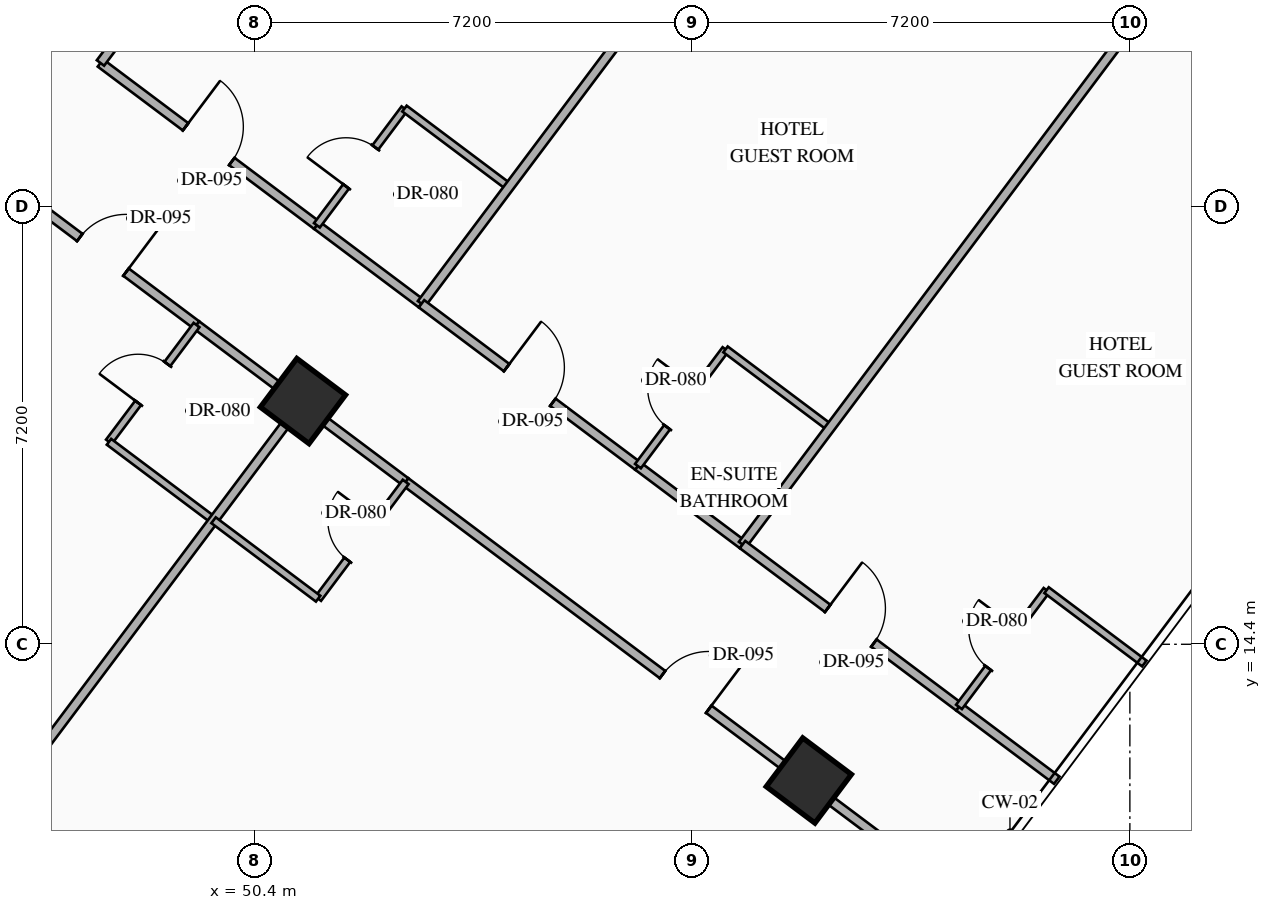
"""IFC4 building model, lengths in metres.
Left out: names, types, materials, properties, quantities, classifications, styles, units other than length and angle.
Written with IfcOpenShell. Run it as: python <this file> out.ifc"""

import sys

from ifc_helpers import new_model, si_unit, direction, frame, frame_2d, origin, origin_2d, place, context, subcontext, project, spatial, rectangle, hollow_rectangle, extrude, element, fill, save


model = new_model("IFC4")
c1 = context("Model", 3, precision=1e-05, world=origin(), true_north=direction((0.0, 1.0)))
c2 = subcontext(c1, "Body", "Model", "MODEL_VIEW")
j1 = project(units=[si_unit("LENGTHUNIT", "METRE"), si_unit("PLANEANGLEUNIT", "RADIAN")], contexts=[c1])
p1 = place(None, origin())
s1 = spatial("IfcSite", under=j1, at=p1, CompositionType="ELEMENT")
p2 = place(p1, origin())
s2 = spatial("IfcBuilding", under=s1, at=p2, CompositionType="ELEMENT")
p3 = place(p2, frame((0.0, 0.0, 53.35)))
s3 = spatial("IfcBuildingStorey", under=s2, at=p3, CompositionType="ELEMENT", Elevation=53.35)
for number, where, z_axis, x_axis in (
    (1, (51.2, 18.4, 0.0), (0.0, 0.0, 1.0), (0.8, -0.6, 0.0)),
    (2, (59.52, 12.16, 0.0), (0.0, 0.0, 1.0), (0.8, -0.6, 0.0)),
):
    element("IfcColumn", number, at=place(p3, frame(where, z_axis=z_axis, x_axis=x_axis)), inside=s3, PredefinedType="COLUMN", context=c2, shape_type="SweptSolid", body=[
        extrude(hollow_rectangle(XDim=1.0, YDim=1.0, WallThickness=0.038, at=origin_2d()), origin(), (0.0, 0.0, 1.0), 3.35),
    ])
p4 = place(p3, frame((44.86, 40.73, 0.0), z_axis=(0.0, 0.0, 1.0), x_axis=(0.800006902154, -0.599990797017, 0.0)))
e3 = element("IfcWall", 3, at=p4, inside=s3, PredefinedType="STANDARD", context=c2, shape_type="SweptSolid", body=[
    extrude(rectangle(XDim=29.712, YDim=0.28, at=frame_2d((14.856, 0.0))), origin(), (0.0, 0.0, 1.0), 3.13),
])
p5 = place(p4, frame((14.249, 0.0, 0.0)))
e4 = element("IfcOpeningElement", 4, at=p5, cuts=e3, PredefinedType="OPENING", context=c2, shape_type="SweptSolid", body=[
    extrude(rectangle(XDim=1.1, YDim=2.2, at=frame_2d((0.55, 1.1))), frame((0.0, 0.15, 0.0), z_axis=(0.0, -1.0, 0.0), x_axis=(1.0, 0.0, 0.0)), (0.0, 0.0, 1.0), 0.3),
])
p6 = place(p4, frame((1.612, 0.0, 0.85)))
e5 = element("IfcOpeningElement", 5, at=p6, cuts=e3, PredefinedType="OPENING", context=c2, shape_type="SweptSolid", body=[
    extrude(rectangle(XDim=1.4, YDim=1.8, at=frame_2d((0.7, 0.9))), frame((0.0, 0.15, 0.0), z_axis=(0.0, -1.0, 0.0), x_axis=(1.0, 0.0, 0.0)), (0.0, 0.0, 1.0), 0.3),
])
p7 = place(p4, frame((5.667, 0.0, 0.85)))
e6 = element("IfcOpeningElement", 6, at=p7, cuts=e3, PredefinedType="OPENING", context=c2, shape_type="SweptSolid", body=[
    extrude(rectangle(XDim=1.4, YDim=1.8, at=frame_2d((0.7, 0.9))), frame((0.0, 0.15, 0.0), z_axis=(0.0, -1.0, 0.0), x_axis=(1.0, 0.0, 0.0)), (0.0, 0.0, 1.0), 0.3),
])
p8 = place(p4, frame((9.912, 0.0, 0.85)))
e7 = element("IfcOpeningElement", 7, at=p8, cuts=e3, PredefinedType="OPENING", context=c2, shape_type="SweptSolid", body=[
    extrude(rectangle(XDim=1.4, YDim=1.8, at=frame_2d((0.7, 0.9))), frame((0.0, 0.15, 0.0), z_axis=(0.0, -1.0, 0.0), x_axis=(1.0, 0.0, 0.0)), (0.0, 0.0, 1.0), 0.3),
])
p9 = place(p4, frame((19.743, 0.0, 0.85)))
e8 = element("IfcOpeningElement", 8, at=p9, cuts=e3, PredefinedType="OPENING", context=c2, shape_type="SweptSolid", body=[
    extrude(rectangle(XDim=1.4, YDim=1.8, at=frame_2d((0.7, 0.9))), frame((0.0, 0.15, 0.0), z_axis=(0.0, -1.0, 0.0), x_axis=(1.0, 0.0, 0.0)), (0.0, 0.0, 1.0), 0.3),
])
p10 = place(p4, frame((22.645, 0.0, 0.85)))
e9 = element("IfcOpeningElement", 9, at=p10, cuts=e3, PredefinedType="OPENING", context=c2, shape_type="SweptSolid", body=[
    extrude(rectangle(XDim=1.4, YDim=1.8, at=frame_2d((0.7, 0.9))), frame((0.0, 0.15, 0.0), z_axis=(0.0, -1.0, 0.0), x_axis=(1.0, 0.0, 0.0)), (0.0, 0.0, 1.0), 0.3),
])
p11 = place(p4, frame((26.7, 0.0, 0.85)))
e10 = element("IfcOpeningElement", 10, at=p11, cuts=e3, PredefinedType="OPENING", context=c2, shape_type="SweptSolid", body=[
    extrude(rectangle(XDim=1.4, YDim=1.8, at=frame_2d((0.7, 0.9))), frame((0.0, 0.15, 0.0), z_axis=(0.0, -1.0, 0.0), x_axis=(1.0, 0.0, 0.0)), (0.0, 0.0, 1.0), 0.3),
])
p12 = place(p3, frame((53.318, 2.487, 0.0), z_axis=(0.0, 0.0, 1.0), x_axis=(-0.800004174678, 0.599994433723, 0.0)))
e11 = element("IfcWall", 11, at=p12, inside=s3, PredefinedType="STANDARD", context=c2, shape_type="SweptSolid", body=[
    extrude(rectangle(XDim=35.089, YDim=0.28, at=frame_2d((17.544, 0.0))), origin(), (0.0, 0.0, 1.0), 3.13),
])
p13 = place(p12, frame((1.931, 0.0, 0.85)))
e12 = element("IfcOpeningElement", 12, at=p13, cuts=e11, PredefinedType="OPENING", context=c2, shape_type="SweptSolid", body=[
    extrude(rectangle(XDim=1.4, YDim=1.8, at=frame_2d((0.7, 0.9))), frame((0.0, 0.15, 0.0), z_axis=(0.0, -1.0, 0.0), x_axis=(1.0, 0.0, 0.0)), (0.0, 0.0, 1.0), 0.3),
])
p14 = place(p12, frame((6.819, 0.0, 0.85)))
e13 = element("IfcOpeningElement", 13, at=p14, cuts=e11, PredefinedType="OPENING", context=c2, shape_type="SweptSolid", body=[
    extrude(rectangle(XDim=1.4, YDim=1.8, at=frame_2d((0.7, 0.9))), frame((0.0, 0.15, 0.0), z_axis=(0.0, -1.0, 0.0), x_axis=(1.0, 0.0, 0.0)), (0.0, 0.0, 1.0), 0.3),
])
p15 = place(p12, frame((11.832, 0.0, 0.85)))
e14 = element("IfcOpeningElement", 14, at=p15, cuts=e11, PredefinedType="OPENING", context=c2, shape_type="SweptSolid", body=[
    extrude(rectangle(XDim=1.4, YDim=1.8, at=frame_2d((0.7, 0.9))), frame((0.0, 0.15, 0.0), z_axis=(0.0, -1.0, 0.0), x_axis=(1.0, 0.0, 0.0)), (0.0, 0.0, 1.0), 0.3),
])
p16 = place(p12, frame((17.647, 0.0, 0.85)))
e15 = element("IfcOpeningElement", 15, at=p16, cuts=e11, PredefinedType="OPENING", context=c2, shape_type="SweptSolid", body=[
    extrude(rectangle(XDim=1.4, YDim=1.8, at=frame_2d((0.7, 0.9))), frame((0.0, 0.15, 0.0), z_axis=(0.0, -1.0, 0.0), x_axis=(1.0, 0.0, 0.0)), (0.0, 0.0, 1.0), 0.3),
])
p17 = place(p12, frame((21.857, 0.0, 0.85)))
e16 = element("IfcOpeningElement", 16, at=p17, cuts=e11, PredefinedType="OPENING", context=c2, shape_type="SweptSolid", body=[
    extrude(rectangle(XDim=1.4, YDim=1.8, at=frame_2d((0.7, 0.9))), frame((0.0, 0.15, 0.0), z_axis=(0.0, -1.0, 0.0), x_axis=(1.0, 0.0, 0.0)), (0.0, 0.0, 1.0), 0.3),
])
p18 = place(p12, frame((26.87, 0.0, 0.85)))
e17 = element("IfcOpeningElement", 17, at=p18, cuts=e11, PredefinedType="OPENING", context=c2, shape_type="SweptSolid", body=[
    extrude(rectangle(XDim=1.4, YDim=1.8, at=frame_2d((0.7, 0.9))), frame((0.0, 0.15, 0.0), z_axis=(0.0, -1.0, 0.0), x_axis=(1.0, 0.0, 0.0)), (0.0, 0.0, 1.0), 0.3),
])
p19 = place(p12, frame((31.757, 0.0, 0.85)))
e18 = element("IfcOpeningElement", 18, at=p19, cuts=e11, PredefinedType="OPENING", context=c2, shape_type="SweptSolid", body=[
    extrude(rectangle(XDim=1.4, YDim=1.8, at=frame_2d((0.7, 0.9))), frame((0.0, 0.15, 0.0), z_axis=(0.0, -1.0, 0.0), x_axis=(1.0, 0.0, 0.0)), (0.0, 0.0, 1.0), 0.3),
])
p20 = place(p3, frame((47.87, 23.96, 0.0), z_axis=(0.0, 0.0, 1.0), x_axis=(0.799993416095, -0.600008778439, 0.0)))
e19 = element("IfcWall", 19, at=p20, inside=s3, PredefinedType="PARTITIONING", context=c2, shape_type="SweptSolid", body=[
    extrude(rectangle(XDim=4.45, YDim=0.15, at=frame_2d((2.225, 0.0))), origin(), (0.0, 0.0, 1.0), 2.775),
])
p21 = place(p20, frame((1.75, 0.0, 0.0)))
e20 = element("IfcOpeningElement", 20, at=p21, cuts=e19, PredefinedType="OPENING", context=c2, shape_type="SweptSolid", body=[
    extrude(rectangle(XDim=0.95, YDim=2.15, at=frame_2d((0.475, 1.075))), frame((0.0, 0.085, 0.0), z_axis=(0.0, -1.0, 0.0), x_axis=(1.0, 0.0, 0.0)), (0.0, 0.0, 1.0), 0.17),
])
p22 = place(p3, frame((51.43, 21.29, 0.0), z_axis=(0.0, 0.0, 1.0), x_axis=(0.79998637334, -0.60001816845, 0.0)))
e21 = element("IfcWall", 21, at=p22, inside=s3, PredefinedType="PARTITIONING", context=c2, shape_type="SweptSolid", body=[
    extrude(rectangle(XDim=2.15, YDim=0.15, at=frame_2d((1.075, 0.0))), origin(), (0.0, 0.0, 1.0), 2.775),
])
p23 = place(p3, frame((51.43, 21.29, 0.0), z_axis=(0.0, 0.0, 1.0), x_axis=(0.600065100855, 0.79995117022, 0.0)))
e22 = element("IfcWall", 22, at=p23, inside=s3, PredefinedType="PARTITIONING", context=c2, shape_type="SweptSolid", body=[
    extrude(rectangle(XDim=2.4, YDim=0.12, at=frame_2d((1.2, 0.0))), origin(), (0.0, 0.0, 1.0), 3.13),
])
p24 = place(p23, frame((0.8, 0.0, 0.0)))
e23 = element("IfcOpeningElement", 23, at=p24, cuts=e22, PredefinedType="OPENING", context=c2, shape_type="SweptSolid", body=[
    extrude(rectangle(XDim=0.8, YDim=2.06, at=frame_2d((0.4, 1.03))), frame((0.0, 0.07, 0.0), z_axis=(0.0, -1.0, 0.0), x_axis=(1.0, 0.0, 0.0)), (0.0, 0.0, 1.0), 0.14),
])
p25 = place(p3, frame((52.87, 23.21, 0.0), z_axis=(0.0, 0.0, 1.0), x_axis=(0.79998637334, -0.60001816845, 0.0)))
e24 = element("IfcWall", 24, at=p25, inside=s3, PredefinedType="PARTITIONING", context=c2, shape_type="SweptSolid", body=[
    extrude(rectangle(XDim=2.15, YDim=0.12, at=frame_2d((1.075, 0.0))), origin(), (0.0, 0.0, 1.0), 3.13),
])
for number, where, z_axis, x_axis in (
    (25, (47.87, 23.96, 0.0), (0.0, 0.0, 1.0), (0.6, 0.8, 0.0)),
    (26, (53.15, 20.0, 0.0), (0.0, 0.0, 1.0), (0.6, 0.8, 0.0)),
):
    element("IfcWall", number, at=place(p3, frame(where, z_axis=z_axis, x_axis=x_axis)), inside=s3, PredefinedType="PARTITIONING", context=c2, shape_type="SweptSolid", body=[
        extrude(rectangle(XDim=11.55, YDim=0.15, at=frame_2d((5.775, 0.0))), origin(), (0.0, 0.0, 1.0), 3.13),
    ])
p26 = place(p3, frame((53.15, 20.0, 0.0), z_axis=(0.0, 0.0, 1.0), x_axis=(0.800013166942, -0.599982443676, 0.0)))
e27 = element("IfcWall", 27, at=p26, inside=s3, PredefinedType="PARTITIONING", context=c2, shape_type="SweptSolid", body=[
    extrude(rectangle(XDim=4.45, YDim=0.15, at=frame_2d((2.225, 0.0))), origin(), (0.0, 0.0, 1.0), 2.775),
])
p27 = place(p26, frame((1.75, 0.0, 0.0)))
e28 = element("IfcOpeningElement", 28, at=p27, cuts=e27, PredefinedType="OPENING", context=c2, shape_type="SweptSolid", body=[
    extrude(rectangle(XDim=0.95, YDim=2.15, at=frame_2d((0.475, 1.075))), frame((0.0, 0.085, 0.0), z_axis=(0.0, -1.0, 0.0), x_axis=(1.0, 0.0, 0.0)), (0.0, 0.0, 1.0), 0.17),
])
p28 = place(p3, frame((56.71, 17.33, 0.0), z_axis=(0.0, 0.0, 1.0), x_axis=(0.79998637334, -0.60001816845, 0.0)))
e29 = element("IfcWall", 29, at=p28, inside=s3, PredefinedType="PARTITIONING", context=c2, shape_type="SweptSolid", body=[
    extrude(rectangle(XDim=2.15, YDim=0.15, at=frame_2d((1.075, 0.0))), origin(), (0.0, 0.0, 1.0), 2.775),
])
p29 = place(p3, frame((56.71, 17.33, 0.0), z_axis=(0.0, 0.0, 1.0), x_axis=(0.6, 0.8, 0.0)))
e30 = element("IfcWall", 30, at=p29, inside=s3, PredefinedType="PARTITIONING", context=c2, shape_type="SweptSolid", body=[
    extrude(rectangle(XDim=2.4, YDim=0.12, at=frame_2d((1.2, 0.0))), origin(), (0.0, 0.0, 1.0), 3.13),
])
p30 = place(p29, frame((0.8, 0.0, 0.0)))
e31 = element("IfcOpeningElement", 31, at=p30, cuts=e30, PredefinedType="OPENING", context=c2, shape_type="SweptSolid", body=[
    extrude(rectangle(XDim=0.8, YDim=2.06, at=frame_2d((0.4, 1.03))), frame((0.0, 0.07, 0.0), z_axis=(0.0, -1.0, 0.0), x_axis=(1.0, 0.0, 0.0)), (0.0, 0.0, 1.0), 0.14),
])
p31 = place(p3, frame((58.15, 19.25, 0.0), z_axis=(0.0, 0.0, 1.0), x_axis=(0.800027249606, -0.599963665473, 0.0)))
e32 = element("IfcWall", 32, at=p31, inside=s3, PredefinedType="PARTITIONING", context=c2, shape_type="SweptSolid", body=[
    extrude(rectangle(XDim=2.15, YDim=0.12, at=frame_2d((1.075, 0.0))), origin(), (0.0, 0.0, 1.0), 3.13),
])
p32 = place(p3, frame((58.43, 16.04, 0.0), z_axis=(0.0, 0.0, 1.0), x_axis=(0.60001014597, 0.799992390422, 0.0)))
e33 = element("IfcWall", 33, at=p32, inside=s3, PredefinedType="PARTITIONING", context=c2, shape_type="SweptSolid", body=[
    extrude(rectangle(XDim=11.55, YDim=0.15, at=frame_2d((5.775, 0.0))), origin(), (0.0, 0.0, 1.0), 3.13),
])
p33 = place(p3, frame((58.43, 16.04, 0.0), z_axis=(0.0, 0.0, 1.0), x_axis=(0.800013166942, -0.599982443676, 0.0)))
e34 = element("IfcWall", 34, at=p33, inside=s3, PredefinedType="PARTITIONING", context=c2, shape_type="SweptSolid", body=[
    extrude(rectangle(XDim=4.45, YDim=0.15, at=frame_2d((2.225, 0.0))), origin(), (0.0, 0.0, 1.0), 2.775),
])
p34 = place(p33, frame((1.75, 0.0, 0.0)))
e35 = element("IfcOpeningElement", 35, at=p34, cuts=e34, PredefinedType="OPENING", context=c2, shape_type="SweptSolid", body=[
    extrude(rectangle(XDim=0.95, YDim=2.15, at=frame_2d((0.475, 1.075))), frame((0.0, 0.085, 0.0), z_axis=(0.0, -1.0, 0.0), x_axis=(1.0, 0.0, 0.0)), (0.0, 0.0, 1.0), 0.17),
])
p35 = place(p3, frame((61.99, 13.37, 0.0), z_axis=(0.0, 0.0, 1.0), x_axis=(0.79997084737, -0.600038868206, 0.0)))
e36 = element("IfcWall", 36, at=p35, inside=s3, PredefinedType="PARTITIONING", context=c2, shape_type="SweptSolid", body=[
    extrude(rectangle(XDim=2.01, YDim=0.15, at=frame_2d((1.005, 0.0))), origin(), (0.0, 0.0, 1.0), 3.13),
])
p36 = place(p3, frame((61.99, 13.37, 0.0), z_axis=(0.0, 0.0, 1.0), x_axis=(0.6, 0.8, 0.0)))
e37 = element("IfcWall", 37, at=p36, inside=s3, PredefinedType="PARTITIONING", context=c2, shape_type="SweptSolid", body=[
    extrude(rectangle(XDim=2.4, YDim=0.12, at=frame_2d((1.2, 0.0))), origin(), (0.0, 0.0, 1.0), 3.13),
])
p37 = place(p36, frame((0.8, 0.0, 0.0)))
e38 = element("IfcOpeningElement", 38, at=p37, cuts=e37, PredefinedType="OPENING", context=c2, shape_type="SweptSolid", body=[
    extrude(rectangle(XDim=0.8, YDim=2.06, at=frame_2d((0.4, 1.03))), frame((0.0, 0.07, 0.0), z_axis=(0.0, -1.0, 0.0), x_axis=(1.0, 0.0, 0.0)), (0.0, 0.0, 1.0), 0.14),
])
p38 = place(p3, frame((63.43, 15.29, 0.0), z_axis=(0.0, 0.0, 1.0), x_axis=(0.800014574191, -0.599980567254, 0.0)))
e39 = element("IfcWall", 39, at=p38, inside=s3, PredefinedType="PARTITIONING", context=c2, shape_type="SweptSolid", body=[
    extrude(rectangle(XDim=2.01, YDim=0.12, at=frame_2d((1.005, 0.0))), origin(), (0.0, 0.0, 1.0), 3.13),
])
p39 = place(p3, frame((46.37, 21.96, 0.0), z_axis=(0.0, 0.0, 1.0), x_axis=(0.799977170108, -0.600030438649, 0.0)))
e40 = element("IfcWall", 40, at=p39, inside=s3, PredefinedType="PARTITIONING", context=c2, shape_type="SweptSolid", body=[
    extrude(rectangle(XDim=3.85, YDim=0.15, at=frame_2d((1.925, 0.0))), origin(), (0.0, 0.0, 1.0), 2.425),
])
p40 = place(p39, frame((1.45, 0.0, 0.0)))
e41 = element("IfcOpeningElement", 41, at=p40, cuts=e40, PredefinedType="OPENING", context=c2, shape_type="SweptSolid", body=[
    extrude(rectangle(XDim=0.95, YDim=2.15, at=frame_2d((0.475, 1.075))), frame((0.0, 0.085, 0.0), z_axis=(0.0, -1.0, 0.0), x_axis=(1.0, 0.0, 0.0)), (0.0, 0.0, 1.0), 0.17),
])
p41 = place(p3, frame((49.45, 19.65, 0.0), z_axis=(0.0, 0.0, 1.0), x_axis=(0.800040880289, -0.59994548908, 0.0)))
e42 = element("IfcWall", 42, at=p41, inside=s3, PredefinedType="PARTITIONING", context=c2, shape_type="SweptSolid", body=[
    extrude(rectangle(XDim=2.15, YDim=0.15, at=frame_2d((1.075, 0.0))), origin(), (0.0, 0.0, 1.0), 2.425),
])
p42 = place(p3, frame((48.01, 17.73, 0.0), z_axis=(0.0, 0.0, 1.0), x_axis=(0.6, 0.8, 0.0)))
e43 = element("IfcWall", 43, at=p42, inside=s3, PredefinedType="PARTITIONING", context=c2, shape_type="SweptSolid", body=[
    extrude(rectangle(XDim=2.4, YDim=0.12, at=frame_2d((1.2, 0.0))), origin(), (0.0, 0.0, 1.0), 3.13),
])
p43 = place(p42, frame((0.8, 0.0, 0.0)))
e44 = element("IfcOpeningElement", 44, at=p43, cuts=e43, PredefinedType="OPENING", context=c2, shape_type="SweptSolid", body=[
    extrude(rectangle(XDim=0.8, YDim=2.06, at=frame_2d((0.4, 1.03))), frame((0.0, 0.07, 0.0), z_axis=(0.0, -1.0, 0.0), x_axis=(1.0, 0.0, 0.0)), (0.0, 0.0, 1.0), 0.14),
])
p44 = place(p3, frame((48.01, 17.73, 0.0), z_axis=(0.0, 0.0, 1.0), x_axis=(0.79998637334, -0.60001816845, 0.0)))
e45 = element("IfcWall", 45, at=p44, inside=s3, PredefinedType="PARTITIONING", context=c2, shape_type="SweptSolid", body=[
    extrude(rectangle(XDim=2.15, YDim=0.12, at=frame_2d((1.075, 0.0))), origin(), (0.0, 0.0, 1.0), 3.13),
])
p45 = place(p3, frame((44.36, 9.28, 0.0), z_axis=(0.0, 0.0, 1.0), x_axis=(0.599986233332, 0.800010324816, 0.0)))
e46 = element("IfcWall", 46, at=p45, inside=s3, PredefinedType="PARTITIONING", context=c2, shape_type="SweptSolid", body=[
    extrude(rectangle(XDim=11.35, YDim=0.15, at=frame_2d((5.675, 0.0))), origin(), (0.0, 0.0, 1.0), 2.425),
])
p46 = place(p3, frame((51.17, 18.36, 0.0), z_axis=(0.0, 0.0, 1.0), x_axis=(0.79998637334, -0.60001816845, 0.0)))
e47 = element("IfcWall", 47, at=p46, inside=s3, PredefinedType="PARTITIONING", context=c2, shape_type="SweptSolid", body=[
    extrude(rectangle(XDim=2.15, YDim=0.15, at=frame_2d((1.075, 0.0))), origin(), (0.0, 0.0, 1.0), 2.425),
])
p47 = place(p3, frame((52.89, 17.07, 0.0), z_axis=(0.0, 0.0, 1.0), x_axis=(0.8, -0.6, 0.0)))
e48 = element("IfcWall", 48, at=p47, inside=s3, PredefinedType="PARTITIONING", context=c2, shape_type="SweptSolid", body=[
    extrude(rectangle(XDim=11.51, YDim=0.15, at=frame_2d((5.755, 0.0))), origin(), (0.0, 0.0, 1.0), 2.425),
])
p48 = place(p47, frame((5.28, 0.0, 0.0)))
e49 = element("IfcOpeningElement", 49, at=p48, cuts=e48, PredefinedType="OPENING", context=c2, shape_type="SweptSolid", body=[
    extrude(rectangle(XDim=0.95, YDim=2.15, at=frame_2d((0.475, 1.075))), frame((0.0, 0.085, 0.0), z_axis=(0.0, -1.0, 0.0), x_axis=(1.0, 0.0, 0.0)), (0.0, 0.0, 1.0), 0.17),
])
p49 = place(p3, frame((51.45, 15.15, 0.0), z_axis=(0.0, 0.0, 1.0), x_axis=(0.599951172744, 0.800036618114, 0.0)))
e50 = element("IfcWall", 50, at=p49, inside=s3, PredefinedType="PARTITIONING", context=c2, shape_type="SweptSolid", body=[
    extrude(rectangle(XDim=2.4, YDim=0.12, at=frame_2d((1.2, 0.0))), origin(), (0.0, 0.0, 1.0), 3.13),
])
p50 = place(p49, frame((0.8, 0.0, 0.0)))
e51 = element("IfcOpeningElement", 51, at=p50, cuts=e50, PredefinedType="OPENING", context=c2, shape_type="SweptSolid", body=[
    extrude(rectangle(XDim=0.8, YDim=2.06, at=frame_2d((0.4, 1.03))), frame((0.0, 0.07, 0.0), z_axis=(0.0, -1.0, 0.0), x_axis=(1.0, 0.0, 0.0)), (0.0, 0.0, 1.0), 0.14),
])
p51 = place(p3, frame((49.73, 16.44, 0.0), z_axis=(0.0, 0.0, 1.0), x_axis=(0.79998637334, -0.60001816845, 0.0)))
e52 = element("IfcWall", 52, at=p51, inside=s3, PredefinedType="PARTITIONING", context=c2, shape_type="SweptSolid", body=[
    extrude(rectangle(XDim=2.15, YDim=0.12, at=frame_2d((1.075, 0.0))), origin(), (0.0, 0.0, 1.0), 3.13),
])
p52 = place(p21, origin())
e53 = element("IfcDoor", 53, at=p52, inside=s3, OperationType="SINGLE_SWING_LEFT", PredefinedType="DOOR", context=c2, shape_type="SweptSolid", body=[
    extrude(rectangle(XDim=0.95, YDim=2.15, at=frame_2d((0.475, 1.075))), frame((0.0, 0.025, 0.0), z_axis=(0.0, -1.0, 0.0), x_axis=(1.0, 0.0, 0.0)), (0.0, 0.0, 1.0), 0.05),
])
fill(e20, e53)
p53 = place(p24, origin())
e54 = element("IfcDoor", 54, at=p53, inside=s3, OperationType="SINGLE_SWING_LEFT", PredefinedType="DOOR", context=c2, shape_type="SweptSolid", body=[
    extrude(rectangle(XDim=0.8, YDim=2.06, at=frame_2d((0.4, 1.03))), frame((0.0, 0.025, 0.0), z_axis=(0.0, -1.0, 0.0), x_axis=(1.0, 0.0, 0.0)), (0.0, 0.0, 1.0), 0.05),
])
fill(e23, e54)
p54 = place(p27, origin())
e55 = element("IfcDoor", 55, at=p54, inside=s3, OperationType="SINGLE_SWING_LEFT", PredefinedType="DOOR", context=c2, shape_type="SweptSolid", body=[
    extrude(rectangle(XDim=0.95, YDim=2.15, at=frame_2d((0.475, 1.075))), frame((0.0, 0.025, 0.0), z_axis=(0.0, -1.0, 0.0), x_axis=(1.0, 0.0, 0.0)), (0.0, 0.0, 1.0), 0.05),
])
fill(e28, e55)
p55 = place(p30, origin())
e56 = element("IfcDoor", 56, at=p55, inside=s3, OperationType="SINGLE_SWING_RIGHT", PredefinedType="DOOR", context=c2, shape_type="SweptSolid", body=[
    extrude(rectangle(XDim=0.8, YDim=2.06, at=frame_2d((0.4, 1.03))), frame((0.0, 0.025, 0.0), z_axis=(0.0, -1.0, 0.0), x_axis=(1.0, 0.0, 0.0)), (0.0, 0.0, 1.0), 0.05),
])
fill(e31, e56)
p56 = place(p34, origin())
e57 = element("IfcDoor", 57, at=p56, inside=s3, OperationType="SINGLE_SWING_LEFT", PredefinedType="DOOR", context=c2, shape_type="SweptSolid", body=[
    extrude(rectangle(XDim=0.95, YDim=2.15, at=frame_2d((0.475, 1.075))), frame((0.0, 0.025, 0.0), z_axis=(0.0, -1.0, 0.0), x_axis=(1.0, 0.0, 0.0)), (0.0, 0.0, 1.0), 0.05),
])
fill(e35, e57)
p57 = place(p37, origin())
e58 = element("IfcDoor", 58, at=p57, inside=s3, OperationType="SINGLE_SWING_RIGHT", PredefinedType="DOOR", context=c2, shape_type="SweptSolid", body=[
    extrude(rectangle(XDim=0.8, YDim=2.06, at=frame_2d((0.4, 1.03))), frame((0.0, 0.025, 0.0), z_axis=(0.0, -1.0, 0.0), x_axis=(1.0, 0.0, 0.0)), (0.0, 0.0, 1.0), 0.05),
])
fill(e38, e58)
p58 = place(p40, origin())
e59 = element("IfcDoor", 59, at=p58, inside=s3, OperationType="SINGLE_SWING_RIGHT", PredefinedType="DOOR", context=c2, shape_type="SweptSolid", body=[
    extrude(rectangle(XDim=0.95, YDim=2.15, at=frame_2d((0.475, 1.075))), frame((0.0, 0.025, 0.0), z_axis=(0.0, -1.0, 0.0), x_axis=(1.0, 0.0, 0.0)), (0.0, 0.0, 1.0), 0.05),
])
fill(e41, e59)
p59 = place(p43, origin())
e60 = element("IfcDoor", 60, at=p59, inside=s3, OperationType="SINGLE_SWING_LEFT", PredefinedType="DOOR", context=c2, shape_type="SweptSolid", body=[
    extrude(rectangle(XDim=0.8, YDim=2.06, at=frame_2d((0.4, 1.03))), frame((0.0, 0.025, 0.0), z_axis=(0.0, -1.0, 0.0), x_axis=(1.0, 0.0, 0.0)), (0.0, 0.0, 1.0), 0.05),
])
fill(e44, e60)
p60 = place(p48, origin())
e61 = element("IfcDoor", 61, at=p60, inside=s3, OperationType="SINGLE_SWING_RIGHT", PredefinedType="DOOR", context=c2, shape_type="SweptSolid", body=[
    extrude(rectangle(XDim=0.95, YDim=2.15, at=frame_2d((0.475, 1.075))), frame((0.0, 0.025, 0.0), z_axis=(0.0, -1.0, 0.0), x_axis=(1.0, 0.0, 0.0)), (0.0, 0.0, 1.0), 0.05),
])
fill(e49, e61)
p61 = place(p50, origin())
e62 = element("IfcDoor", 62, at=p61, inside=s3, OperationType="SINGLE_SWING_RIGHT", PredefinedType="DOOR", context=c2, shape_type="SweptSolid", body=[
    extrude(rectangle(XDim=0.8, YDim=2.06, at=frame_2d((0.4, 1.03))), frame((0.0, 0.025, 0.0), z_axis=(0.0, -1.0, 0.0), x_axis=(1.0, 0.0, 0.0)), (0.0, 0.0, 1.0), 0.05),
])
fill(e51, e62)
save(model, sys.argv[1])
